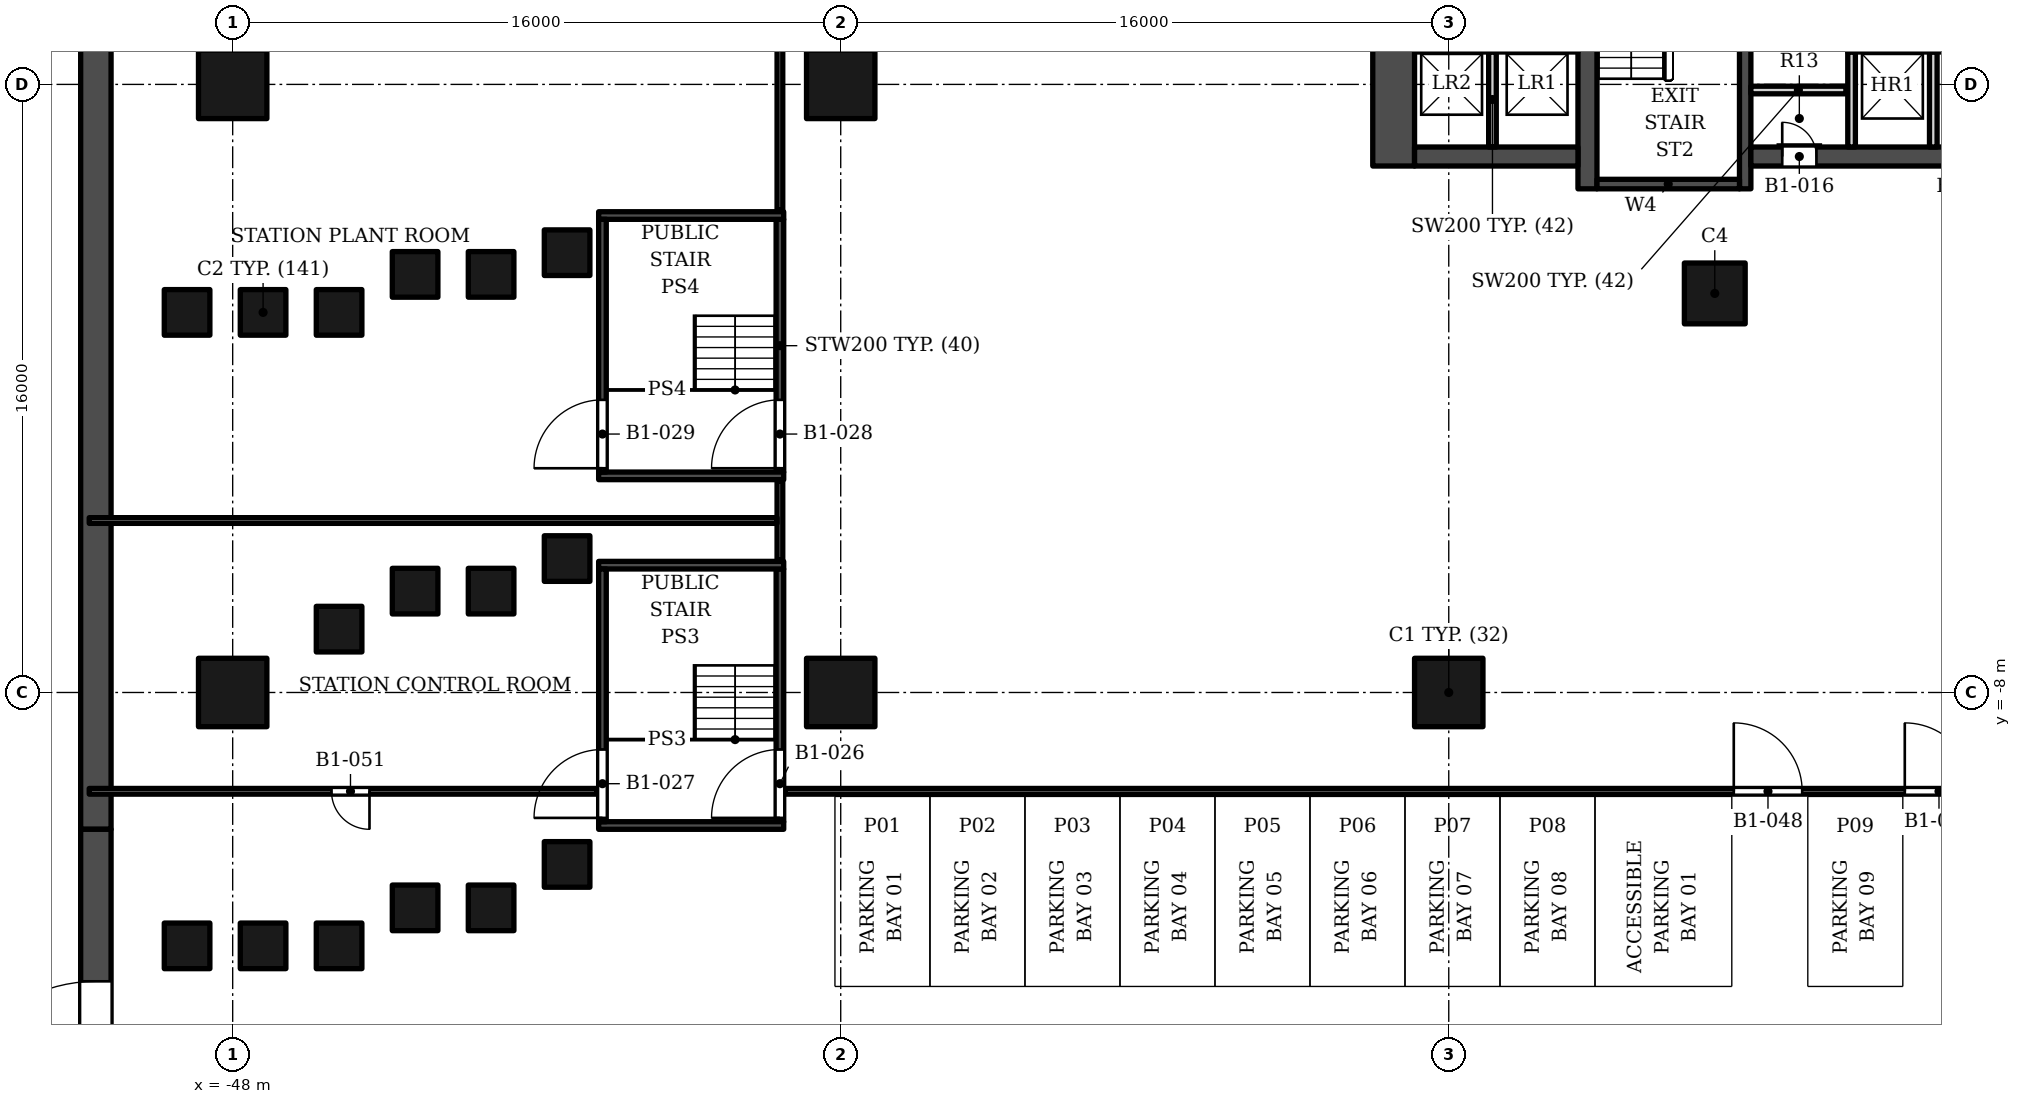
"""IFC4 building model, lengths in metres.
Left out: names, types, materials, properties, quantities, classifications, styles, units other than length and angle.
Written with IfcOpenShell. Run it as: python <this file> out.ifc"""

import sys

from ifc_helpers import new_model, si_unit, direction, frame, frame_2d, origin, origin_2d, place, context, subcontext, project, spatial, rectangle, extrude, element, fill, save


model = new_model("IFC4")
c1 = context("Model", 3, precision=1e-05, world=origin(), true_north=direction((0.0, 1.0)))
c2 = subcontext(c1, "Body", "Model", "MODEL_VIEW")
j1 = project(units=[si_unit("LENGTHUNIT", "METRE"), si_unit("PLANEANGLEUNIT", "RADIAN")], contexts=[c1])
p1 = place(None, origin())
s1 = spatial("IfcSite", under=j1, at=p1, CompositionType="ELEMENT")
p2 = place(p1, origin())
s2 = spatial("IfcBuilding", under=s1, at=p2, CompositionType="ELEMENT")
p3 = place(p2, frame((0.0, 0.0, -5.0)))
s3 = spatial("IfcBuildingStorey", under=s2, at=p3, CompositionType="ELEMENT", Elevation=-5.0)
p4 = place(p3, frame((-51.6, -23.6, 0.0), z_axis=(0.0, 0.0, 1.0), x_axis=(0.0, 1.0, 0.0)))
e1 = element("IfcWall", 1, at=p4, inside=s3, PredefinedType="SHEAR", context=c2, shape_type="SweptSolid", body=[
    extrude(rectangle(XDim=12.0, YDim=0.8, at=frame_2d((6.0, 0.0))), origin(), (0.0, 0.0, 1.0), 5.0),
])
p5 = place(p4, frame((4.0, 0.0, 0.0)))
e2 = element("IfcOpeningElement", 2, at=p5, cuts=e1, PredefinedType="OPENING", context=c2, shape_type="SweptSolid", body=[
    extrude(rectangle(XDim=4.0, YDim=2.5, at=frame_2d((2.0, 1.25))), frame((0.0, 0.41, 0.0), z_axis=(0.0, -1.0, 0.0), x_axis=(1.0, 0.0, 0.0)), (0.0, 0.0, 1.0), 0.82),
])
p6 = place(p3, frame((-51.6, 21.0, 0.0), z_axis=(0.0, 0.0, 1.0), x_axis=(0.0, -1.0, 0.0)))
e3 = element("IfcWall", 3, at=p6, inside=s3, PredefinedType="SHEAR", context=c2, shape_type="SweptSolid", body=[
    extrude(rectangle(XDim=32.6, YDim=0.8, at=frame_2d((16.3, 0.0))), origin(), (0.0, 0.0, 1.0), 5.0),
])
for number, where, z_axis, x_axis in (
    (4, (-48.0, -8.0, 0.0), (0.0, 0.0, 1.0), (1.0, 0.0, 0.0)),
    (5, (-48.0, 8.0, 0.0), (0.0, 0.0, 1.0), (1.0, 0.0, 0.0)),
    (6, (-32.0, -8.0, 0.0), (0.0, 0.0, 1.0), (1.0, 0.0, 0.0)),
    (7, (-32.0, 8.0, 0.0), (0.0, 0.0, 1.0), (1.0, 0.0, 0.0)),
    (8, (-16.0, -8.0, 0.0), (0.0, 0.0, 1.0), (1.0, 0.0, 0.0)),
):
    element("IfcColumn", number, at=place(p3, frame(where, z_axis=z_axis, x_axis=x_axis)), inside=s3, PredefinedType="COLUMN", context=c2, shape_type="SweptSolid", body=[
        extrude(rectangle(XDim=1.8, YDim=1.8, at=origin_2d()), origin(), (0.0, 0.0, 1.0), 5.0),
    ])
for number, where, z_axis, x_axis in (
    (9, (-39.2, -12.524, 0.0), (0.0, 0.0, 1.0), (1.0, 0.0, 0.0)),
    (10, (-39.2, -4.476, 0.0), (0.0, 0.0, 1.0), (1.0, 0.0, 0.0)),
    (11, (-39.2, 3.572, 0.0), (0.0, 0.0, 1.0), (1.0, 0.0, 0.0)),
    (12, (-41.2, -13.667, 0.0), (0.0, 0.0, 1.0), (1.0, 0.0, 0.0)),
    (13, (-41.2, -5.333, 0.0), (0.0, 0.0, 1.0), (1.0, 0.0, 0.0)),
    (14, (-41.2, 3.001, 0.0), (0.0, 0.0, 1.0), (1.0, 0.0, 0.0)),
    (15, (-43.2, -13.667, 0.0), (0.0, 0.0, 1.0), (1.0, 0.0, 0.0)),
    (16, (-43.2, -5.333, 0.0), (0.0, 0.0, 1.0), (1.0, 0.0, 0.0)),
    (17, (-43.2, 3.001, 0.0), (0.0, 0.0, 1.0), (1.0, 0.0, 0.0)),
    (18, (-45.2, -14.667, 0.0), (0.0, 0.0, 1.0), (1.0, 0.0, 0.0)),
    (19, (-45.2, -6.333, 0.0), (0.0, 0.0, 1.0), (1.0, 0.0, 0.0)),
    (20, (-45.2, 2.001, 0.0), (0.0, 0.0, 1.0), (1.0, 0.0, 0.0)),
    (21, (-47.2, -14.667, 0.0), (0.0, 0.0, 1.0), (1.0, 0.0, 0.0)),
    (22, (-47.2, 2.001, 0.0), (0.0, 0.0, 1.0), (1.0, 0.0, 0.0)),
    (23, (-49.2, -14.667, 0.0), (0.0, 0.0, 1.0), (1.0, 0.0, 0.0)),
    (24, (-49.2, 2.001, 0.0), (0.0, 0.0, 1.0), (1.0, 0.0, 0.0)),
):
    element("IfcColumn", number, at=place(p3, frame(where, z_axis=z_axis, x_axis=x_axis)), inside=s3, PredefinedType="COLUMN", context=c2, shape_type="SweptSolid", body=[
        extrude(rectangle(XDim=1.2, YDim=1.2, at=origin_2d()), origin(), (0.0, 0.0, 1.0), 5.0),
    ])
p7 = place(p3, frame((-9.0, 2.5, 0.0), z_axis=(0.0, 0.0, 1.0), x_axis=(1.0, 0.0, 0.0)))
e25 = element("IfcColumn", 25, at=p7, inside=s3, PredefinedType="COLUMN", context=c2, shape_type="SweptSolid", body=[
    extrude(rectangle(XDim=1.6, YDim=1.6, at=origin_2d()), origin(), (0.0, 0.0, 1.0), 5.0),
])
p8 = place(p3, frame((-12.35, 5.253, 0.0), z_axis=(0.0, 0.0, 1.0), x_axis=(0.0, 1.0, 0.0)))
e26 = element("IfcWall", 26, at=p8, inside=s3, PredefinedType="SHEAR", context=c2, shape_type="SweptSolid", body=[
    extrude(rectangle(XDim=13.3, YDim=0.5, at=frame_2d((6.65, 0.0))), origin(), (0.0, 0.0, 1.0), 5.0),
])
p9 = place(p3, frame((-8.2, 5.253, 0.0), z_axis=(0.0, 0.0, 1.0), x_axis=(0.0, 1.0, 0.0)))
e27 = element("IfcWall", 27, at=p9, inside=s3, PredefinedType="SHEAR", context=c2, shape_type="SweptSolid", body=[
    extrude(rectangle(XDim=13.3, YDim=0.3, at=frame_2d((6.65, 0.0))), origin(), (0.0, 0.0, 1.0), 5.0),
])
p10 = place(p9, frame((7.1, 0.0, 0.0)))
e28 = element("IfcOpeningElement", 28, at=p10, cuts=e27, PredefinedType="OPENING", context=c2, shape_type="SweptSolid", body=[
    extrude(rectangle(XDim=1.4, YDim=2.1, at=frame_2d((0.7, 1.05))), frame((0.0, 0.16, 0.0), z_axis=(0.0, -1.0, 0.0), x_axis=(1.0, 0.0, 0.0)), (0.0, 0.0, 1.0), 0.32),
])
p11 = place(p9, frame((5.05, 0.0, 0.0)))
e29 = element("IfcOpeningElement", 29, at=p11, cuts=e27, PredefinedType="OPENING", context=c2, shape_type="SweptSolid", body=[
    extrude(rectangle(XDim=1.4, YDim=2.1, at=frame_2d((0.7, 1.05))), frame((0.0, 0.16, 0.0), z_axis=(0.0, -1.0, 0.0), x_axis=(1.0, 0.0, 0.0)), (0.0, 0.0, 1.0), 0.32),
])
p12 = place(p3, frame((-12.1, 5.378, 0.0), z_axis=(0.0, 0.0, 1.0), x_axis=(1.0, 0.0, 0.0)))
e30 = element("IfcWall", 30, at=p12, inside=s3, PredefinedType="SHEAR", context=c2, shape_type="SweptSolid", body=[
    extrude(rectangle(XDim=3.75, YDim=0.25, at=frame_2d((1.875, 0.0))), origin(), (0.0, 0.0, 1.0), 5.0),
])
p13 = place(p3, frame((-8.05, 6.103, 0.0), z_axis=(0.0, 0.0, 1.0), x_axis=(1.0, 0.0, 0.0)))
e31 = element("IfcWall", 31, at=p13, inside=s3, PredefinedType="SHEAR", context=c2, shape_type="SweptSolid", body=[
    extrude(rectangle(XDim=7.05, YDim=0.5, at=frame_2d((3.525, 0.0))), origin(), (0.0, 0.0, 1.0), 5.0),
])
p14 = place(p13, frame((0.825, 0.0, 0.0)))
e32 = element("IfcOpeningElement", 32, at=p14, cuts=e31, PredefinedType="OPENING", context=c2, shape_type="SweptSolid", body=[
    extrude(rectangle(XDim=0.9, YDim=2.1, at=frame_2d((0.45, 1.05))), frame((0.0, 0.26, 0.0), z_axis=(0.0, -1.0, 0.0), x_axis=(1.0, 0.0, 0.0)), (0.0, 0.0, 1.0), 0.52),
])
p15 = place(p3, frame((-12.6, 6.103, 0.0), z_axis=(0.0, 0.0, 1.0), x_axis=(-1.0, 0.0, 0.0)))
e33 = element("IfcWall", 33, at=p15, inside=s3, PredefinedType="SHEAR", context=c2, shape_type="SweptSolid", body=[
    extrude(rectangle(XDim=4.3, YDim=0.5, at=frame_2d((2.15, 0.0))), origin(), (0.0, 0.0, 1.0), 5.0),
])
p16 = place(p3, frame((-17.45, 5.853, 0.0), z_axis=(0.0, 0.0, 1.0), x_axis=(0.0, 1.0, 0.0)))
e34 = element("IfcWall", 34, at=p16, inside=s3, PredefinedType="SHEAR", context=c2, shape_type="SweptSolid", body=[
    extrude(rectangle(XDim=13.2, YDim=1.1, at=frame_2d((6.6, 0.0))), origin(), (0.0, 0.0, 1.0), 5.0),
])
p17 = place(p16, frame((4.1, 0.0, 0.0)))
e35 = element("IfcOpeningElement", 35, at=p17, cuts=e34, PredefinedType="OPENING", context=c2, shape_type="SweptSolid", body=[
    extrude(rectangle(XDim=1.6, YDim=2.1, at=frame_2d((0.8, 1.05))), frame((0.0, 0.56, 0.0), z_axis=(0.0, -1.0, 0.0), x_axis=(1.0, 0.0, 0.0)), (0.0, 0.0, 1.0), 1.12),
])
p18 = place(p16, frame((9.75, 0.0, 0.0)))
e36 = element("IfcOpeningElement", 36, at=p18, cuts=e34, PredefinedType="OPENING", context=c2, shape_type="SweptSolid", body=[
    extrude(rectangle(XDim=0.9, YDim=2.1, at=frame_2d((0.45, 1.05))), frame((0.0, 0.56, 0.0), z_axis=(0.0, -1.0, 0.0), x_axis=(1.0, 0.0, 0.0)), (0.0, 0.0, 1.0), 1.12),
])
for number, where, z_axis, x_axis in (
    (37, (-14.85, 6.353, 0.0), (0.0, 0.0, 1.0), (0.0, 1.0, 0.0)),
    (38, (-5.4, 6.353, 0.0), (0.0, 0.0, 1.0), (0.0, 1.0, 0.0)),
    (39, (-3.25, 6.353, 0.0), (0.0, 0.0, 1.0), (0.0, 1.0, 0.0)),
    (40, (-8.05, 7.853, 0.0), (0.0, 0.0, 1.0), (1.0, 0.0, 0.0)),
):
    element("IfcWall", number, at=place(p3, frame(where, z_axis=z_axis, x_axis=x_axis)), inside=s3, PredefinedType="SOLIDWALL", context=c2, shape_type="SweptSolid", body=[
        extrude(rectangle(XDim=2.5, YDim=0.2, at=frame_2d((1.25, 0.0))), origin(), (0.0, 0.0, 1.0), 4.45),
    ])
for number, where, z_axis, x_axis in (
    (41, (-38.37, -11.5, 0.0), (0.0, 0.0, 1.0), (1.0, 0.0, 0.0)),
    (42, (-38.37, -4.65, 0.0), (0.0, 0.0, 1.0), (1.0, 0.0, 0.0)),
):
    element("IfcWall", number, at=place(p3, frame(where, z_axis=z_axis, x_axis=x_axis)), inside=s3, PredefinedType="SOLIDWALL", context=c2, shape_type="SweptSolid", body=[
        extrude(rectangle(XDim=4.87, YDim=0.2, at=frame_2d((2.435, 0.0))), origin(), (0.0, 0.0, 1.0), 4.45),
    ])
p19 = place(p3, frame((-38.27, -11.4, 0.0), z_axis=(0.0, 0.0, 1.0), x_axis=(0.0, 1.0, 0.0)))
e43 = element("IfcWall", 43, at=p19, inside=s3, PredefinedType="SOLIDWALL", context=c2, shape_type="SweptSolid", body=[
    extrude(rectangle(XDim=6.65, YDim=0.2, at=frame_2d((3.325, 0.0))), origin(), (0.0, 0.0, 1.0), 4.45),
])
p20 = place(p19, frame((0.1, 0.0, 0.0)))
e44 = element("IfcOpeningElement", 44, at=p20, cuts=e43, PredefinedType="OPENING", context=c2, shape_type="SweptSolid", body=[
    extrude(rectangle(XDim=1.8, YDim=2.4, at=frame_2d((0.9, 1.2))), frame((0.0, 0.11, 0.0), z_axis=(0.0, -1.0, 0.0), x_axis=(1.0, 0.0, 0.0)), (0.0, 0.0, 1.0), 0.22),
])
p21 = place(p3, frame((-33.6, -11.4, 0.0), z_axis=(0.0, 0.0, 1.0), x_axis=(0.0, 1.0, 0.0)))
e45 = element("IfcWall", 45, at=p21, inside=s3, PredefinedType="SOLIDWALL", context=c2, shape_type="SweptSolid", body=[
    extrude(rectangle(XDim=6.65, YDim=0.2, at=frame_2d((3.325, 0.0))), origin(), (0.0, 0.0, 1.0), 4.45),
])
p22 = place(p21, frame((0.1, 0.0, 0.0)))
e46 = element("IfcOpeningElement", 46, at=p22, cuts=e45, PredefinedType="OPENING", context=c2, shape_type="SweptSolid", body=[
    extrude(rectangle(XDim=1.8, YDim=2.4, at=frame_2d((0.9, 1.2))), frame((0.0, 0.11, 0.0), z_axis=(0.0, -1.0, 0.0), x_axis=(1.0, 0.0, 0.0)), (0.0, 0.0, 1.0), 0.22),
])
for number, where, z_axis, x_axis in (
    (47, (-38.37, -2.3, 0.0), (0.0, 0.0, 1.0), (1.0, 0.0, 0.0)),
    (48, (-38.37, 4.55, 0.0), (0.0, 0.0, 1.0), (1.0, 0.0, 0.0)),
):
    element("IfcWall", number, at=place(p3, frame(where, z_axis=z_axis, x_axis=x_axis)), inside=s3, PredefinedType="SOLIDWALL", context=c2, shape_type="SweptSolid", body=[
        extrude(rectangle(XDim=4.87, YDim=0.2, at=frame_2d((2.435, 0.0))), origin(), (0.0, 0.0, 1.0), 4.45),
    ])
p23 = place(p3, frame((-38.27, -2.2, 0.0), z_axis=(0.0, 0.0, 1.0), x_axis=(0.0, 1.0, 0.0)))
e49 = element("IfcWall", 49, at=p23, inside=s3, PredefinedType="SOLIDWALL", context=c2, shape_type="SweptSolid", body=[
    extrude(rectangle(XDim=6.65, YDim=0.2, at=frame_2d((3.325, 0.0))), origin(), (0.0, 0.0, 1.0), 4.45),
])
p24 = place(p23, frame((0.1, 0.0, 0.0)))
e50 = element("IfcOpeningElement", 50, at=p24, cuts=e49, PredefinedType="OPENING", context=c2, shape_type="SweptSolid", body=[
    extrude(rectangle(XDim=1.8, YDim=2.4, at=frame_2d((0.9, 1.2))), frame((0.0, 0.11, 0.0), z_axis=(0.0, -1.0, 0.0), x_axis=(1.0, 0.0, 0.0)), (0.0, 0.0, 1.0), 0.22),
])
p25 = place(p3, frame((-33.6, -2.2, 0.0), z_axis=(0.0, 0.0, 1.0), x_axis=(0.0, 1.0, 0.0)))
e51 = element("IfcWall", 51, at=p25, inside=s3, PredefinedType="SOLIDWALL", context=c2, shape_type="SweptSolid", body=[
    extrude(rectangle(XDim=6.65, YDim=0.2, at=frame_2d((3.325, 0.0))), origin(), (0.0, 0.0, 1.0), 4.45),
])
p26 = place(p25, frame((0.1, 0.0, 0.0)))
e52 = element("IfcOpeningElement", 52, at=p26, cuts=e51, PredefinedType="OPENING", context=c2, shape_type="SweptSolid", body=[
    extrude(rectangle(XDim=1.8, YDim=2.4, at=frame_2d((0.9, 1.2))), frame((0.0, 0.11, 0.0), z_axis=(0.0, -1.0, 0.0), x_axis=(1.0, 0.0, 0.0)), (0.0, 0.0, 1.0), 0.22),
])
p27 = place(p3, frame((-51.775, -10.6, 0.0), z_axis=(0.0, 0.0, 1.0), x_axis=(1.0, 0.0, 0.0)))
e53 = element("IfcWall", 53, at=p27, inside=s3, PredefinedType="PARTITIONING", context=c2, shape_type="SweptSolid", body=[
    extrude(rectangle(XDim=13.365, YDim=0.15, at=frame_2d((6.683, 0.0))), origin(), (0.0, 0.0, 1.0), 3.55),
])
p28 = place(p27, frame((6.375, 0.0, 0.0)))
e54 = element("IfcOpeningElement", 54, at=p28, cuts=e53, PredefinedType="OPENING", context=c2, shape_type="SweptSolid", body=[
    extrude(rectangle(XDim=1.0, YDim=2.1, at=frame_2d((0.5, 1.05))), frame((0.0, 0.085, 0.0), z_axis=(0.0, -1.0, 0.0), x_axis=(1.0, 0.0, 0.0)), (0.0, 0.0, 1.0), 0.17),
])
p29 = place(p3, frame((-33.46, -10.6, 0.0), z_axis=(0.0, 0.0, 1.0), x_axis=(1.0, 0.0, 0.0)))
e55 = element("IfcWall", 55, at=p29, inside=s3, PredefinedType="PARTITIONING", context=c2, shape_type="SweptSolid", body=[
    extrude(rectangle(XDim=66.92, YDim=0.15, at=frame_2d((33.46, 0.0))), origin(), (0.0, 0.0, 1.0), 3.25),
])
p30 = place(p29, frame((29.46, 0.0, 0.0)))
e56 = element("IfcOpeningElement", 56, at=p30, cuts=e55, PredefinedType="OPENING", context=c2, shape_type="SweptSolid", body=[
    extrude(rectangle(XDim=1.8, YDim=2.1, at=frame_2d((0.9, 1.05))), frame((0.0, 0.085, 0.0), z_axis=(0.0, -1.0, 0.0), x_axis=(1.0, 0.0, 0.0)), (0.0, 0.0, 1.0), 0.17),
])
p31 = place(p29, frame((35.71, 0.0, 0.0)))
e57 = element("IfcOpeningElement", 57, at=p31, cuts=e55, PredefinedType="OPENING", context=c2, shape_type="SweptSolid", body=[
    extrude(rectangle(XDim=1.8, YDim=2.1, at=frame_2d((0.9, 1.05))), frame((0.0, 0.085, 0.0), z_axis=(0.0, -1.0, 0.0), x_axis=(1.0, 0.0, 0.0)), (0.0, 0.0, 1.0), 0.17),
])
p32 = place(p29, frame((24.96, 0.0, 0.0)))
e58 = element("IfcOpeningElement", 58, at=p32, cuts=e55, PredefinedType="OPENING", context=c2, shape_type="SweptSolid", body=[
    extrude(rectangle(XDim=1.8, YDim=2.1, at=frame_2d((0.9, 1.05))), frame((0.0, 0.085, 0.0), z_axis=(0.0, -1.0, 0.0), x_axis=(1.0, 0.0, 0.0)), (0.0, 0.0, 1.0), 0.17),
])
p33 = place(p3, frame((-33.6, -4.51, 0.0), z_axis=(0.0, 0.0, 1.0), x_axis=(0.0, 1.0, 0.0)))
e59 = element("IfcWall", 59, at=p33, inside=s3, PredefinedType="PARTITIONING", context=c2, shape_type="SweptSolid", body=[
    extrude(rectangle(XDim=2.07, YDim=0.15, at=frame_2d((1.035, 0.0))), origin(), (0.0, 0.0, 1.0), 4.45),
])
p34 = place(p3, frame((-51.775, -3.475, 0.0), z_axis=(0.0, 0.0, 1.0), x_axis=(1.0, 0.0, 0.0)))
e60 = element("IfcWall", 60, at=p34, inside=s3, PredefinedType="PARTITIONING", context=c2, shape_type="SweptSolid", body=[
    extrude(rectangle(XDim=18.1, YDim=0.15, at=frame_2d((9.05, 0.0))), origin(), (0.0, 0.0, 1.0), 3.55),
])
p35 = place(p3, frame((-33.6, 4.69, 0.0), z_axis=(0.0, 0.0, 1.0), x_axis=(0.0, 1.0, 0.0)))
e61 = element("IfcWall", 61, at=p35, inside=s3, PredefinedType="PARTITIONING", context=c2, shape_type="SweptSolid", body=[
    extrude(rectangle(XDim=9.07, YDim=0.15, at=frame_2d((4.535, 0.0))), origin(), (0.0, 0.0, 1.0), 3.25),
])
p36 = place(p35, frame((5.885, 0.0, 0.0)))
e62 = element("IfcOpeningElement", 62, at=p36, cuts=e61, PredefinedType="OPENING", context=c2, shape_type="SweptSolid", body=[
    extrude(rectangle(XDim=1.0, YDim=2.1, at=frame_2d((0.5, 1.05))), frame((0.0, 0.085, 0.0), z_axis=(0.0, -1.0, 0.0), x_axis=(1.0, 0.0, 0.0)), (0.0, 0.0, 1.0), 0.17),
])
p37 = place(p5, origin())
e63 = element("IfcDoor", 63, at=p37, inside=s3, OperationType="SINGLE_SWING_LEFT", PredefinedType="DOOR", context=c2, shape_type="SweptSolid", body=[
    extrude(rectangle(XDim=4.0, YDim=2.5, at=frame_2d((2.0, 1.25))), frame((0.0, 0.025, 0.0), z_axis=(0.0, -1.0, 0.0), x_axis=(1.0, 0.0, 0.0)), (0.0, 0.0, 1.0), 0.05),
])
fill(e2, e63)
p38 = place(p14, origin())
e64 = element("IfcDoor", 64, at=p38, inside=s3, OperationType="SINGLE_SWING_LEFT", PredefinedType="DOOR", context=c2, shape_type="SweptSolid", body=[
    extrude(rectangle(XDim=0.9, YDim=2.1, at=frame_2d((0.45, 1.05))), frame((0.0, 0.025, 0.0), z_axis=(0.0, -1.0, 0.0), x_axis=(1.0, 0.0, 0.0)), (0.0, 0.0, 1.0), 0.05),
])
fill(e32, e64)
p39 = place(p22, origin())
e65 = element("IfcDoor", 65, at=p39, inside=s3, OperationType="DOUBLE_DOOR_SINGLE_SWING", PredefinedType="DOOR", context=c2, shape_type="SweptSolid", body=[
    extrude(rectangle(XDim=1.8, YDim=2.4, at=frame_2d((0.9, 1.2))), frame((0.0, 0.025, 0.0), z_axis=(0.0, -1.0, 0.0), x_axis=(1.0, 0.0, 0.0)), (0.0, 0.0, 1.0), 0.05),
])
fill(e46, e65)
p40 = place(p20, origin())
e66 = element("IfcDoor", 66, at=p40, inside=s3, OperationType="DOUBLE_DOOR_SINGLE_SWING", PredefinedType="DOOR", context=c2, shape_type="SweptSolid", body=[
    extrude(rectangle(XDim=1.8, YDim=2.4, at=frame_2d((0.9, 1.2))), frame((0.0, 0.025, 0.0), z_axis=(0.0, -1.0, 0.0), x_axis=(1.0, 0.0, 0.0)), (0.0, 0.0, 1.0), 0.05),
])
fill(e44, e66)
p41 = place(p26, origin())
e67 = element("IfcDoor", 67, at=p41, inside=s3, OperationType="DOUBLE_DOOR_SINGLE_SWING", PredefinedType="DOOR", context=c2, shape_type="SweptSolid", body=[
    extrude(rectangle(XDim=1.8, YDim=2.4, at=frame_2d((0.9, 1.2))), frame((0.0, 0.025, 0.0), z_axis=(0.0, -1.0, 0.0), x_axis=(1.0, 0.0, 0.0)), (0.0, 0.0, 1.0), 0.05),
])
fill(e52, e67)
p42 = place(p24, origin())
e68 = element("IfcDoor", 68, at=p42, inside=s3, OperationType="DOUBLE_DOOR_SINGLE_SWING", PredefinedType="DOOR", context=c2, shape_type="SweptSolid", body=[
    extrude(rectangle(XDim=1.8, YDim=2.4, at=frame_2d((0.9, 1.2))), frame((0.0, 0.025, 0.0), z_axis=(0.0, -1.0, 0.0), x_axis=(1.0, 0.0, 0.0)), (0.0, 0.0, 1.0), 0.05),
])
fill(e50, e68)
p43 = place(p30, origin())
e69 = element("IfcDoor", 69, at=p43, inside=s3, OperationType="DOUBLE_DOOR_SINGLE_SWING", PredefinedType="DOOR", context=c2, shape_type="SweptSolid", body=[
    extrude(rectangle(XDim=1.8, YDim=2.1, at=frame_2d((0.9, 1.05))), frame((0.0, 0.025, 0.0), z_axis=(0.0, -1.0, 0.0), x_axis=(1.0, 0.0, 0.0)), (0.0, 0.0, 1.0), 0.05),
])
fill(e56, e69)
p44 = place(p32, origin())
e70 = element("IfcDoor", 70, at=p44, inside=s3, OperationType="DOUBLE_DOOR_SINGLE_SWING", PredefinedType="DOOR", context=c2, shape_type="SweptSolid", body=[
    extrude(rectangle(XDim=1.8, YDim=2.1, at=frame_2d((0.9, 1.05))), frame((0.0, 0.025, 0.0), z_axis=(0.0, -1.0, 0.0), x_axis=(1.0, 0.0, 0.0)), (0.0, 0.0, 1.0), 0.05),
])
fill(e58, e70)
p45 = place(p28, origin())
e71 = element("IfcDoor", 71, at=p45, inside=s3, OperationType="SINGLE_SWING_RIGHT", PredefinedType="DOOR", context=c2, shape_type="SweptSolid", body=[
    extrude(rectangle(XDim=1.0, YDim=2.1, at=frame_2d((0.5, 1.05))), frame((0.0, 0.025, 0.0), z_axis=(0.0, -1.0, 0.0), x_axis=(1.0, 0.0, 0.0)), (0.0, 0.0, 1.0), 0.05),
])
fill(e54, e71)
save(model, sys.argv[1])
